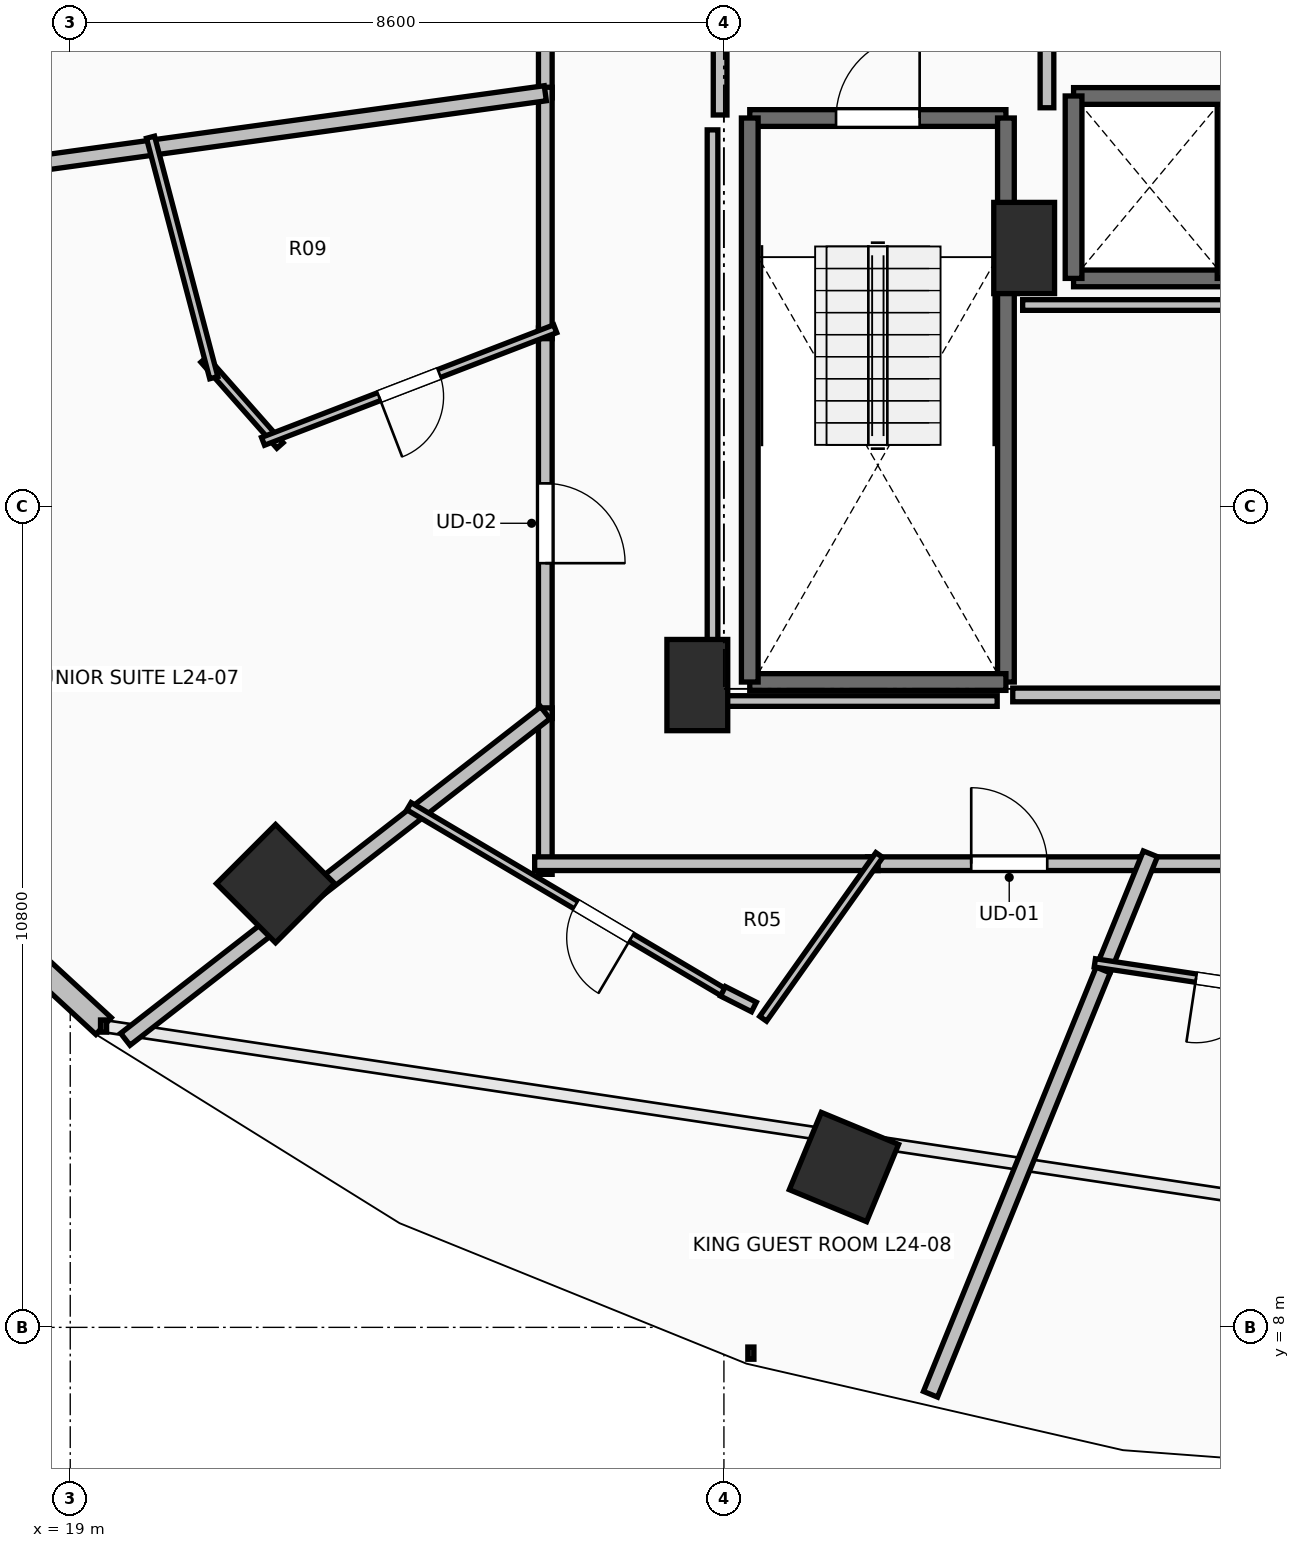
"""IFC4 building model, lengths in metres.
Left out: names, types, materials, properties, quantities, classifications, styles, units other than length and angle.
Written with IfcOpenShell. Run it as: python <this file> out.ifc"""

import sys

from ifc_helpers import new_model, si_unit, direction, frame, frame_2d, origin, origin_2d, place, context, subcontext, project, spatial, rectangle, extrude, element, fill, save


model = new_model("IFC4")
c1 = context("Model", 3, precision=1e-05, world=origin(), true_north=direction((0.0, 1.0)))
c2 = subcontext(c1, "Body", "Model", "MODEL_VIEW")
j1 = project(units=[si_unit("LENGTHUNIT", "METRE"), si_unit("PLANEANGLEUNIT", "RADIAN")], contexts=[c1])
p1 = place(None, origin())
s1 = spatial("IfcSite", under=j1, at=p1, CompositionType="ELEMENT")
p2 = place(p1, origin())
s2 = spatial("IfcBuilding", under=s1, at=p2, CompositionType="ELEMENT")
p3 = place(p2, frame((0.0, 0.0, 92.8)))
s3 = spatial("IfcBuildingStorey", under=s2, at=p3, CompositionType="ELEMENT", Elevation=92.8)
for number, where, z_axis, x_axis in (
    (1, (21.701, 13.838, 0.0), (0.0, 0.0, 1.0), (-0.707, -0.707, 0.0)),
    (2, (29.179, 10.109, 0.0), (0.0, 0.0, 1.0), (-0.383, -0.924, 0.0)),
):
    element("IfcColumn", number, at=place(p3, frame(where, z_axis=z_axis, x_axis=x_axis)), inside=s3, PredefinedType="COLUMN", context=c2, shape_type="SweptSolid", body=[
        extrude(rectangle(XDim=1.1, YDim=1.1, at=origin_2d()), origin(), (0.0, 0.0, 1.0), 3.5),
    ])
for number, where, z_axis, x_axis in (
    (3, (27.25, 16.45, 0.0), (0.0, 0.0, 1.0), (1.0, 0.0, 0.0)),
    (4, (31.55, 22.2, 0.0), (0.0, 0.0, 1.0), (1.0, 0.0, 0.0)),
):
    element("IfcColumn", number, at=place(p3, frame(where, z_axis=z_axis, x_axis=x_axis)), inside=s3, PredefinedType="PILASTER", context=c2, shape_type="SweptSolid", body=[
        extrude(rectangle(XDim=0.8, YDim=1.2, at=origin_2d()), origin(), (0.0, 0.0, 1.0), 3.5),
    ])
p4 = place(p3, frame((16.174, 14.972, 0.0), z_axis=(0.0, 0.0, 1.0), x_axis=(0.735416718093, -0.677615119924, 0.0)))
e5 = element("IfcWall", 5, at=p4, inside=s3, PredefinedType="STANDARD", context=c2, shape_type="SweptSolid", body=[
    extrude(rectangle(XDim=4.439, YDim=0.3, at=frame_2d((2.22, 0.0))), origin(), (0.0, 0.0, 1.0), 3.24),
])
p5 = place(p4, frame((1.32, 0.0, 0.85)))
e6 = element("IfcOpeningElement", 6, at=p5, cuts=e5, PredefinedType="OPENING", context=c2, shape_type="SweptSolid", body=[
    extrude(rectangle(XDim=1.8, YDim=2.19, at=frame_2d((0.9, 1.095))), frame((0.0, 0.165, 0.0), z_axis=(0.0, -1.0, 0.0), x_axis=(1.0, 0.0, 0.0)), (0.0, 0.0, 1.0), 0.33),
])
p6 = place(p3, frame((27.94, 23.91, 0.0), z_axis=(0.0, 0.0, 1.0), x_axis=(1.0, 0.0, 0.0)))
e7 = element("IfcWall", 7, at=p6, inside=s3, PredefinedType="SOLIDWALL", context=c2, shape_type="SweptSolid", body=[
    extrude(rectangle(XDim=3.37, YDim=0.22, at=frame_2d((1.685, 0.0))), origin(), (0.0, 0.0, 1.0), 3.24),
])
p7 = place(p6, frame((1.135, 0.0, 0.0)))
e8 = element("IfcOpeningElement", 8, at=p7, cuts=e7, PredefinedType="OPENING", context=c2, shape_type="SweptSolid", body=[
    extrude(rectangle(XDim=1.1, YDim=2.15, at=frame_2d((0.55, 1.075))), frame((0.0, 0.125, 0.0), z_axis=(0.0, -1.0, 0.0), x_axis=(1.0, 0.0, 0.0)), (0.0, 0.0, 1.0), 0.25),
])
p8 = place(p3, frame((31.31, 23.91, 0.0), z_axis=(0.0, 0.0, 1.0), x_axis=(0.0, -1.0, 0.0)))
e9 = element("IfcWall", 9, at=p8, inside=s3, PredefinedType="SOLIDWALL", context=c2, shape_type="SweptSolid", body=[
    extrude(rectangle(XDim=7.42, YDim=0.22, at=frame_2d((3.71, 0.0))), origin(), (0.0, 0.0, 1.0), 3.24),
])
p9 = place(p3, frame((31.31, 16.49, 0.0), z_axis=(0.0, 0.0, 1.0), x_axis=(-1.0, 0.0, 0.0)))
e10 = element("IfcWall", 10, at=p9, inside=s3, PredefinedType="SOLIDWALL", context=c2, shape_type="SweptSolid", body=[
    extrude(rectangle(XDim=3.37, YDim=0.22, at=frame_2d((1.685, 0.0))), origin(), (0.0, 0.0, 1.0), 3.24),
])
p10 = place(p3, frame((27.94, 16.49, 0.0), z_axis=(0.0, 0.0, 1.0), x_axis=(0.0, 1.0, 0.0)))
e11 = element("IfcWall", 11, at=p10, inside=s3, PredefinedType="SOLIDWALL", context=c2, shape_type="SweptSolid", body=[
    extrude(rectangle(XDim=7.42, YDim=0.22, at=frame_2d((3.71, 0.0))), origin(), (0.0, 0.0, 1.0), 3.24),
])
p11 = place(p3, frame((32.2, 21.8, 0.0), z_axis=(0.0, 0.0, 1.0), x_axis=(1.0, 0.0, 0.0)))
e12 = element("IfcWall", 12, at=p11, inside=s3, PredefinedType="SOLIDWALL", context=c2, shape_type="SweptSolid", body=[
    extrude(rectangle(XDim=2.0, YDim=0.22, at=frame_2d((1.0, 0.0))), origin(), (0.0, 0.0, 1.0), 3.24),
])
p12 = place(p3, frame((34.2, 21.8, 0.0), z_axis=(0.0, 0.0, 1.0), x_axis=(0.0, 1.0, 0.0)))
e13 = element("IfcWall", 13, at=p12, inside=s3, PredefinedType="SOLIDWALL", context=c2, shape_type="SweptSolid", body=[
    extrude(rectangle(XDim=2.4, YDim=0.22, at=frame_2d((1.2, 0.0))), origin(), (0.0, 0.0, 1.0), 3.24),
])
p13 = place(p3, frame((34.2, 24.2, 0.0), z_axis=(0.0, 0.0, 1.0), x_axis=(-1.0, 0.0, 0.0)))
e14 = element("IfcWall", 14, at=p13, inside=s3, PredefinedType="SOLIDWALL", context=c2, shape_type="SweptSolid", body=[
    extrude(rectangle(XDim=2.0, YDim=0.22, at=frame_2d((1.0, 0.0))), origin(), (0.0, 0.0, 1.0), 3.24),
])
p14 = place(p3, frame((32.2, 24.2, 0.0), z_axis=(0.0, 0.0, 1.0), x_axis=(0.0, -1.0, 0.0)))
e15 = element("IfcWall", 15, at=p14, inside=s3, PredefinedType="SOLIDWALL", context=c2, shape_type="SweptSolid", body=[
    extrude(rectangle(XDim=2.4, YDim=0.22, at=frame_2d((1.2, 0.0))), origin(), (0.0, 0.0, 1.0), 3.24),
])
p15 = place(p3, frame((31.85, 24.045, 0.0), z_axis=(0.0, 0.0, 1.0), x_axis=(0.0, 1.0, 0.0)))
e16 = element("IfcWall", 16, at=p15, inside=s3, PredefinedType="PARTITIONING", context=c2, shape_type="SweptSolid", body=[
    extrude(rectangle(XDim=3.91, YDim=0.18, at=frame_2d((1.955, 0.0))), origin(), (0.0, 0.0, 1.0), 3.24),
])
p16 = place(p15, frame((1.355, 0.0, 0.0)))
e17 = element("IfcOpeningElement", 17, at=p16, cuts=e16, PredefinedType="OPENING", context=c2, shape_type="SweptSolid", body=[
    extrude(rectangle(XDim=1.2, YDim=2.15, at=frame_2d((0.6, 1.075))), frame((0.0, 0.105, 0.0), z_axis=(0.0, -1.0, 0.0), x_axis=(1.0, 0.0, 0.0)), (0.0, 0.0, 1.0), 0.21),
])
p17 = place(p3, frame((27.55, 28.0, 0.0), z_axis=(0.0, 0.0, 1.0), x_axis=(0.0, -1.0, 0.0)))
e18 = element("IfcWall", 18, at=p17, inside=s3, PredefinedType="PARTITIONING", context=c2, shape_type="SweptSolid", body=[
    extrude(rectangle(XDim=4.05, YDim=0.18, at=frame_2d((2.025, 0.0))), origin(), (0.0, 0.0, 1.0), 3.24),
])
p18 = place(p17, frame((1.425, 0.0, 0.0)))
e19 = element("IfcOpeningElement", 19, at=p18, cuts=e18, PredefinedType="OPENING", context=c2, shape_type="SweptSolid", body=[
    extrude(rectangle(XDim=1.2, YDim=2.15, at=frame_2d((0.6, 1.075))), frame((0.0, 0.105, 0.0), z_axis=(0.0, -1.0, 0.0), x_axis=(1.0, 0.0, 0.0)), (0.0, 0.0, 1.0), 0.21),
])
p19 = place(p3, frame((31.4, 16.32, 0.0), z_axis=(0.0, 0.0, 1.0), x_axis=(1.0, 0.0, 0.0)))
e20 = element("IfcWall", 20, at=p19, inside=s3, PredefinedType="PARTITIONING", context=c2, shape_type="SweptSolid", body=[
    extrude(rectangle(XDim=7.4, YDim=0.18, at=frame_2d((3.7, 0.0))), origin(), (0.0, 0.0, 1.0), 3.24),
])
p20 = place(p19, frame((3.275, 0.0, 0.0)))
e21 = element("IfcOpeningElement", 21, at=p20, cuts=e20, PredefinedType="OPENING", context=c2, shape_type="SweptSolid", body=[
    extrude(rectangle(XDim=0.85, YDim=2.1, at=frame_2d((0.425, 1.05))), frame((0.0, 0.105, 0.0), z_axis=(0.0, -1.0, 0.0), x_axis=(1.0, 0.0, 0.0)), (0.0, 0.0, 1.0), 0.21),
])
p21 = place(p3, frame((25.25, 28.065, 0.0), z_axis=(0.0, 0.0, 1.0), x_axis=(0.0, -1.0, 0.0)))
e22 = element("IfcWall", 22, at=p21, inside=s3, PredefinedType="PARTITIONING", context=c2, shape_type="SweptSolid", body=[
    extrude(rectangle(XDim=3.89, YDim=0.18, at=frame_2d((1.945, 0.0))), origin(), (0.0, 0.0, 1.0), 2.432),
])
p22 = place(p21, frame((1.42, 0.0, 0.0)))
e23 = element("IfcOpeningElement", 23, at=p22, cuts=e22, PredefinedType="OPENING", context=c2, shape_type="SweptSolid", body=[
    extrude(rectangle(XDim=1.05, YDim=2.2, at=frame_2d((0.525, 1.1))), frame((0.0, 0.105, 0.0), z_axis=(0.0, -1.0, 0.0), x_axis=(1.0, 0.0, 0.0)), (0.0, 0.0, 1.0), 0.21),
])
p23 = place(p3, frame((25.25, 21.147, 0.0), z_axis=(0.0, 0.0, 1.0), x_axis=(0.0, -1.0, 0.0)))
e24 = element("IfcWall", 24, at=p23, inside=s3, PredefinedType="PARTITIONING", context=c2, shape_type="SweptSolid", body=[
    extrude(rectangle(XDim=5.137, YDim=0.18, at=frame_2d((2.568, 0.0))), origin(), (0.0, 0.0, 1.0), 2.432),
])
p24 = place(p23, frame((2.043, 0.0, 0.0)))
e25 = element("IfcOpeningElement", 25, at=p24, cuts=e24, PredefinedType="OPENING", context=c2, shape_type="SweptSolid", body=[
    extrude(rectangle(XDim=1.05, YDim=2.2, at=frame_2d((0.525, 1.1))), frame((0.0, 0.105, 0.0), z_axis=(0.0, -1.0, 0.0), x_axis=(1.0, 0.0, 0.0)), (0.0, 0.0, 1.0), 0.21),
])
p25 = place(p3, frame((25.25, 24.315, 0.0), z_axis=(0.0, 0.0, 1.0), x_axis=(0.0, -1.0, 0.0)))
e26 = element("IfcWall", 26, at=p25, inside=s3, PredefinedType="PARTITIONING", context=c2, shape_type="SweptSolid", body=[
    extrude(rectangle(XDim=3.308, YDim=0.18, at=frame_2d((1.654, 0.0))), origin(), (0.0, 0.0, 1.0), 3.24),
])
p26 = place(p3, frame((29.489, 14.1, 0.0), z_axis=(0.0, 0.0, 1.0), x_axis=(1.0, 0.0, 0.0)))
e27 = element("IfcWall", 27, at=p26, inside=s3, PredefinedType="PARTITIONING", context=c2, shape_type="SweptSolid", body=[
    extrude(rectangle(XDim=3.729, YDim=0.18, at=frame_2d((1.865, 0.0))), origin(), (0.0, 0.0, 1.0), 3.24),
])
p27 = place(p26, frame((1.365, 0.0, 0.0)))
e28 = element("IfcOpeningElement", 28, at=p27, cuts=e27, PredefinedType="OPENING", context=c2, shape_type="SweptSolid", body=[
    extrude(rectangle(XDim=1.0, YDim=2.15, at=frame_2d((0.5, 1.075))), frame((0.0, 0.105, 0.0), z_axis=(0.0, -1.0, 0.0), x_axis=(1.0, 0.0, 0.0)), (0.0, 0.0, 1.0), 0.21),
])
p28 = place(p3, frame((25.25, 16.15, 0.0), z_axis=(0.0, 0.0, 1.0), x_axis=(0.0, -1.0, 0.0)))
e29 = element("IfcWall", 29, at=p28, inside=s3, PredefinedType="PARTITIONING", context=c2, shape_type="SweptSolid", body=[
    extrude(rectangle(XDim=2.19, YDim=0.18, at=frame_2d((1.095, 0.0))), origin(), (0.0, 0.0, 1.0), 2.432),
])
p29 = place(p3, frame((25.11, 14.1, 0.0), z_axis=(0.0, 0.0, 1.0), x_axis=(1.0, 0.0, 0.0)))
e30 = element("IfcWall", 30, at=p29, inside=s3, PredefinedType="PARTITIONING", context=c2, shape_type="SweptSolid", body=[
    extrude(rectangle(XDim=4.519, YDim=0.18, at=frame_2d((2.259, 0.0))), origin(), (0.0, 0.0, 1.0), 2.432),
])
p30 = place(p3, frame((33.078, 14.1, 0.0), z_axis=(0.0, 0.0, 1.0), x_axis=(1.0, 0.0, 0.0)))
e31 = element("IfcWall", 31, at=p30, inside=s3, PredefinedType="PARTITIONING", context=c2, shape_type="SweptSolid", body=[
    extrude(rectangle(XDim=3.13, YDim=0.18, at=frame_2d((1.565, 0.0))), origin(), (0.0, 0.0, 1.0), 2.972),
])
p31 = place(p3, frame((12.215, 22.433, 0.0), z_axis=(0.0, 0.0, 1.0), x_axis=(0.990569013426, 0.137014705927, 0.0)))
e32 = element("IfcWall", 32, at=p31, inside=s3, PredefinedType="PARTITIONING", context=c2, shape_type="SweptSolid", body=[
    extrude(rectangle(XDim=13.159, YDim=0.2, at=frame_2d((6.58, 0.0))), origin(), (0.0, 0.0, 1.0), 2.677),
])
p32 = place(p3, frame((21.76, 19.602, 0.0), z_axis=(0.0, 0.0, 1.0), x_axis=(-0.661931735756, 0.749564124808, 0.0)))
e33 = element("IfcWall", 33, at=p32, inside=s3, PredefinedType="PARTITIONING", context=c2, shape_type="SweptSolid", body=[
    extrude(rectangle(XDim=1.51, YDim=0.11, at=frame_2d((0.755, 0.0))), origin(), (0.0, 0.0, 1.0), 3.24),
])
p33 = place(p3, frame((20.889, 20.494, 0.0), z_axis=(0.0, 0.0, 1.0), x_axis=(-0.254405137241, 0.967097733502, 0.0)))
e34 = element("IfcWall", 34, at=p33, inside=s3, PredefinedType="PARTITIONING", context=c2, shape_type="SweptSolid", body=[
    extrude(rectangle(XDim=3.271, YDim=0.11, at=frame_2d((1.636, 0.0))), origin(), (0.0, 0.0, 1.0), 2.922),
])
p34 = place(p3, frame((25.381, 21.137, 0.0), z_axis=(0.0, 0.0, 1.0), x_axis=(-0.933189718051, -0.359384126144, 0.0)))
e35 = element("IfcWall", 35, at=p34, inside=s3, PredefinedType="PARTITIONING", context=c2, shape_type="SweptSolid", body=[
    extrude(rectangle(XDim=4.119, YDim=0.11, at=frame_2d((2.06, 0.0))), origin(), (0.0, 0.0, 1.0), 2.972),
])
p35 = place(p34, frame((1.635, 0.0, 0.0)))
e36 = element("IfcOpeningElement", 36, at=p35, cuts=e35, PredefinedType="OPENING", context=c2, shape_type="SweptSolid", body=[
    extrude(rectangle(XDim=0.85, YDim=2.1, at=frame_2d((0.425, 1.05))), frame((0.0, 0.07, 0.0), z_axis=(0.0, -1.0, 0.0), x_axis=(1.0, 0.0, 0.0)), (0.0, 0.0, 1.0), 0.14),
])
p36 = place(p3, frame((19.725, 11.79, 0.0), z_axis=(0.0, 0.0, 1.0), x_axis=(0.789438616042, 0.613829513384, 0.0)))
e37 = element("IfcWall", 37, at=p36, inside=s3, PredefinedType="PARTITIONING", context=c2, shape_type="SweptSolid", body=[
    extrude(rectangle(XDim=6.999, YDim=0.2, at=frame_2d((3.499, 0.0))), origin(), (0.0, 0.0, 1.0), 2.432),
])
p37 = place(p3, frame((27.611, 12.399, 0.0), z_axis=(0.0, 0.0, 1.0), x_axis=(-0.860667615303, 0.509167218081, 0.0)))
e38 = element("IfcWall", 38, at=p37, inside=s3, PredefinedType="PARTITIONING", context=c2, shape_type="SweptSolid", body=[
    extrude(rectangle(XDim=4.827, YDim=0.11, at=frame_2d((2.413, 0.0))), origin(), (0.0, 0.0, 1.0), 2.432),
])
p38 = place(p37, frame((1.428, 0.0, 0.0)))
e39 = element("IfcOpeningElement", 39, at=p38, cuts=e38, PredefinedType="OPENING", context=c2, shape_type="SweptSolid", body=[
    extrude(rectangle(XDim=0.85, YDim=2.1, at=frame_2d((0.425, 1.05))), frame((0.0, 0.07, 0.0), z_axis=(0.0, -1.0, 0.0), x_axis=(1.0, 0.0, 0.0)), (0.0, 0.0, 1.0), 0.14),
])
p39 = place(p3, frame((29.644, 14.214, 0.0), z_axis=(0.0, 0.0, 1.0), x_axis=(-0.578550668744, -0.815646445279, 0.0)))
e40 = element("IfcWall", 40, at=p39, inside=s3, PredefinedType="PARTITIONING", context=c2, shape_type="SweptSolid", body=[
    extrude(rectangle(XDim=2.641, YDim=0.11, at=frame_2d((1.321, 0.0))), origin(), (0.0, 0.0, 1.0), 2.432),
])
p40 = place(p3, frame((30.318, 7.12, 0.0), z_axis=(0.0, 0.0, 1.0), x_axis=(0.376920780929, 0.926245499263, 0.0)))
e41 = element("IfcWall", 41, at=p40, inside=s3, PredefinedType="PARTITIONING", context=c2, shape_type="SweptSolid", body=[
    extrude(rectangle(XDim=6.166, YDim=0.2, at=frame_2d((3.083, 0.0))), origin(), (0.0, 0.0, 1.0), 2.677),
])
p41 = place(p3, frame((32.589, 12.701, 0.0), z_axis=(0.0, 0.0, 1.0), x_axis=(0.376742177728, 0.926318158907, 0.0)))
e42 = element("IfcWall", 42, at=p41, inside=s3, PredefinedType="PARTITIONING", context=c2, shape_type="SweptSolid", body=[
    extrude(rectangle(XDim=1.65, YDim=0.2, at=frame_2d((0.825, 0.0))), origin(), (0.0, 0.0, 1.0), 2.972),
])
p42 = place(p3, frame((35.983, 12.267, 0.0), z_axis=(0.0, 0.0, 1.0), x_axis=(-0.988843169739, 0.148960349288, 0.0)))
e43 = element("IfcWall", 43, at=p42, inside=s3, PredefinedType="PARTITIONING", context=c2, shape_type="SweptSolid", body=[
    extrude(rectangle(XDim=3.543, YDim=0.11, at=frame_2d((1.772, 0.0))), origin(), (0.0, 0.0, 1.0), 2.922),
])
p43 = place(p42, frame((1.347, 0.0, 0.0)))
e44 = element("IfcOpeningElement", 44, at=p43, cuts=e43, PredefinedType="OPENING", context=c2, shape_type="SweptSolid", body=[
    extrude(rectangle(XDim=0.85, YDim=2.1, at=frame_2d((0.425, 1.05))), frame((0.0, 0.07, 0.0), z_axis=(0.0, -1.0, 0.0), x_axis=(1.0, 0.0, 0.0)), (0.0, 0.0, 1.0), 0.14),
])
p44 = place(p3, frame((36.439, 21.45, 0.0), z_axis=(0.0, 0.0, 1.0), x_axis=(-1.0, 0.0, 0.0)))
e45 = element("IfcWall", 45, at=p44, inside=s3, PredefinedType="PARTITIONING", context=c2, shape_type="SweptSolid", body=[
    extrude(rectangle(XDim=4.909, YDim=0.14, at=frame_2d((2.455, 0.0))), origin(), (0.0, 0.0, 1.0), 3.24),
])
p45 = place(p3, frame((31.195, 16.24, 0.0), z_axis=(0.0, 0.0, 1.0), x_axis=(-1.0, 0.0, 0.0)))
e46 = element("IfcWall", 46, at=p45, inside=s3, PredefinedType="PARTITIONING", context=c2, shape_type="SweptSolid", body=[
    extrude(rectangle(XDim=3.745, YDim=0.14, at=frame_2d((1.873, 0.0))), origin(), (0.0, 0.0, 1.0), 2.432),
])
p46 = place(p3, frame((27.45, 16.24, 0.0), z_axis=(0.0, 0.0, 1.0), x_axis=(0.0, 1.0, 0.0)))
e47 = element("IfcWall", 47, at=p46, inside=s3, PredefinedType="PARTITIONING", context=c2, shape_type="SweptSolid", body=[
    extrude(rectangle(XDim=7.514, YDim=0.14, at=frame_2d((3.757, 0.0))), origin(), (0.0, 0.0, 1.0), 2.432),
])
p47 = place(p3, frame((27.587, 12.421, 0.0), z_axis=(0.0, 0.0, 1.0), x_axis=(0.892279780373, -0.451482882884, 0.0)))
e48 = element("IfcWall", 48, at=p47, inside=s3, PredefinedType="PARTITIONING", context=c2, shape_type="SweptSolid", body=[
    extrude(rectangle(XDim=0.457, YDim=0.14, at=frame_2d((0.229, 0.0))), origin(), (0.0, 0.0, 1.0), 3.24),
])
p48 = place(p7, origin())
e49 = element("IfcDoor", 49, at=p48, inside=s3, OperationType="SINGLE_SWING_RIGHT", PredefinedType="DOOR", context=c2, shape_type="SweptSolid", body=[
    extrude(rectangle(XDim=1.1, YDim=2.15, at=frame_2d((0.55, 1.075))), frame((0.0, 0.025, 0.0), z_axis=(0.0, -1.0, 0.0), x_axis=(1.0, 0.0, 0.0)), (0.0, 0.0, 1.0), 0.05),
])
fill(e8, e49)
p49 = place(p24, origin())
e50 = element("IfcDoor", 50, at=p49, inside=s3, OperationType="SINGLE_SWING_RIGHT", PredefinedType="DOOR", context=c2, shape_type="SweptSolid", body=[
    extrude(rectangle(XDim=1.05, YDim=2.2, at=frame_2d((0.525, 1.1))), frame((0.0, 0.025, 0.0), z_axis=(0.0, -1.0, 0.0), x_axis=(1.0, 0.0, 0.0)), (0.0, 0.0, 1.0), 0.05),
])
fill(e25, e50)
p50 = place(p27, origin())
e51 = element("IfcDoor", 51, at=p50, inside=s3, OperationType="SINGLE_SWING_LEFT", PredefinedType="DOOR", context=c2, shape_type="SweptSolid", body=[
    extrude(rectangle(XDim=1.0, YDim=2.15, at=frame_2d((0.5, 1.075))), frame((0.0, 0.025, 0.0), z_axis=(0.0, -1.0, 0.0), x_axis=(1.0, 0.0, 0.0)), (0.0, 0.0, 1.0), 0.05),
])
fill(e28, e51)
p51 = place(p35, origin())
e52 = element("IfcDoor", 52, at=p51, inside=s3, OperationType="SINGLE_SWING_RIGHT", PredefinedType="DOOR", context=c2, shape_type="SweptSolid", body=[
    extrude(rectangle(XDim=0.85, YDim=2.1, at=frame_2d((0.425, 1.05))), frame((0.0, 0.025, 0.0), z_axis=(0.0, -1.0, 0.0), x_axis=(1.0, 0.0, 0.0)), (0.0, 0.0, 1.0), 0.05),
])
fill(e36, e52)
p52 = place(p38, origin())
e53 = element("IfcDoor", 53, at=p52, inside=s3, OperationType="SINGLE_SWING_LEFT", PredefinedType="DOOR", context=c2, shape_type="SweptSolid", body=[
    extrude(rectangle(XDim=0.85, YDim=2.1, at=frame_2d((0.425, 1.05))), frame((0.0, 0.025, 0.0), z_axis=(0.0, -1.0, 0.0), x_axis=(1.0, 0.0, 0.0)), (0.0, 0.0, 1.0), 0.05),
])
fill(e39, e53)
p53 = place(p43, origin())
e54 = element("IfcDoor", 54, at=p53, inside=s3, OperationType="SINGLE_SWING_RIGHT", PredefinedType="DOOR", context=c2, shape_type="SweptSolid", body=[
    extrude(rectangle(XDim=0.85, YDim=2.1, at=frame_2d((0.425, 1.05))), frame((0.0, 0.025, 0.0), z_axis=(0.0, -1.0, 0.0), x_axis=(1.0, 0.0, 0.0)), (0.0, 0.0, 1.0), 0.05),
])
fill(e44, e54)
save(model, sys.argv[1])
